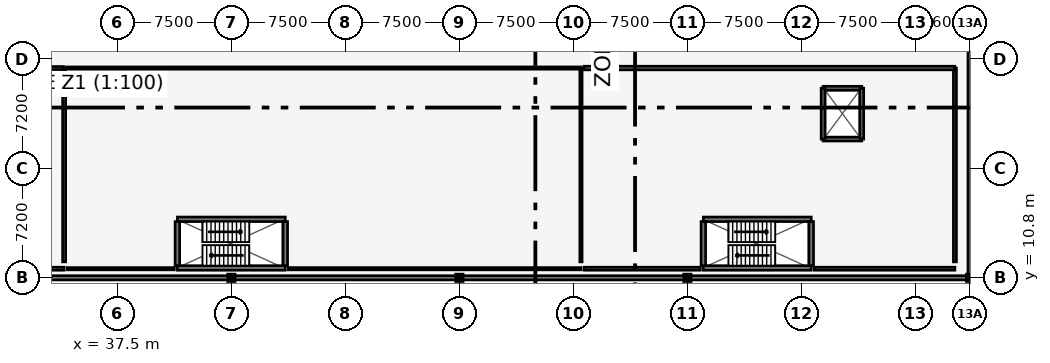
"""IFC4 building model, lengths in metres.
Left out: names, types, materials, properties, quantities, classifications, styles, units other than length and angle.
Written with IfcOpenShell. Run it as: python <this file> out.ifc"""

import sys

from ifc_helpers import new_model, si_unit, direction, frame, frame_2d, origin, origin_2d, place, context, subcontext, project, spatial, rectangle, i_section, extrude, element, fill, save


model = new_model("IFC4")
c1 = context("Model", 3, precision=1e-05, world=origin(), true_north=direction((0.0, 1.0)))
c2 = subcontext(c1, "Body", "Model", "MODEL_VIEW")
j1 = project(units=[si_unit("LENGTHUNIT", "METRE"), si_unit("PLANEANGLEUNIT", "RADIAN")], contexts=[c1])
p1 = place(None, origin())
s1 = spatial("IfcSite", under=j1, at=p1, CompositionType="ELEMENT")
p2 = place(p1, origin())
s2 = spatial("IfcBuilding", under=s1, at=p2, CompositionType="ELEMENT")
p3 = place(p2, frame((0.0, 0.0, 9.0)))
s3 = spatial("IfcBuildingStorey", under=s2, at=p3, CompositionType="ELEMENT", Elevation=9.0)
for number, where, z_axis, x_axis in (
    (1, (45.0, 10.8, 0.0), (0.0, 0.0, 1.0), (1.0, 0.0, 0.0)),
    (2, (60.0, 10.8, 0.0), (0.0, 0.0, 1.0), (1.0, 0.0, 0.0)),
    (3, (75.0, 10.8, 0.0), (0.0, 0.0, 1.0), (1.0, 0.0, 0.0)),
    (4, (93.6, 10.8, 0.0), (0.0, 0.0, 1.0), (1.0, 0.0, 0.0)),
):
    element("IfcColumn", number, at=place(p3, frame(where, z_axis=z_axis, x_axis=x_axis)), inside=s3, PredefinedType="COLUMN", context=c2, shape_type="SweptSolid", body=[
        extrude(i_section(OverallWidth=0.307, OverallDepth=0.315, WebThickness=0.012, FlangeThickness=0.019, at=origin_2d()), origin(), (0.0, 0.0, 1.0), 4.2),
    ])
p4 = place(p3, frame((0.0, 10.8, 0.0), z_axis=(0.0, 0.0, 1.0), x_axis=(1.0, 0.0, 0.0)))
e5 = element("IfcWall", 5, at=p4, inside=s3, PredefinedType="SOLIDWALL", context=c2, shape_type="SweptSolid", body=[
    extrude(rectangle(XDim=93.6, YDim=0.28, at=frame_2d((46.8, 0.0))), origin(), (0.0, 0.0, 1.0), 3.058),
])
p5 = place(p4, frame((2.2, 0.0, 0.78)))
e6 = element("IfcOpeningElement", 6, at=p5, cuts=e5, PredefinedType="OPENING", context=c2, shape_type="SweptSolid", body=[
    extrude(rectangle(XDim=1.25, YDim=1.7, at=frame_2d((0.625, 0.85))), frame((0.0, 0.15, 0.0), z_axis=(0.0, -1.0, 0.0), x_axis=(1.0, 0.0, 0.0)), (0.0, 0.0, 1.0), 0.3),
])
p6 = place(p4, frame((9.4, 0.0, 0.78)))
e7 = element("IfcOpeningElement", 7, at=p6, cuts=e5, PredefinedType="OPENING", context=c2, shape_type="SweptSolid", body=[
    extrude(rectangle(XDim=1.35, YDim=1.75, at=frame_2d((0.675, 0.875))), frame((0.0, 0.15, 0.0), z_axis=(0.0, -1.0, 0.0), x_axis=(1.0, 0.0, 0.0)), (0.0, 0.0, 1.0), 0.3),
])
p7 = place(p4, frame((16.6, 0.0, 0.78)))
e8 = element("IfcOpeningElement", 8, at=p7, cuts=e5, PredefinedType="OPENING", context=c2, shape_type="SweptSolid", body=[
    extrude(rectangle(XDim=1.5, YDim=1.75, at=frame_2d((0.75, 0.875))), frame((0.0, 0.15, 0.0), z_axis=(0.0, -1.0, 0.0), x_axis=(1.0, 0.0, 0.0)), (0.0, 0.0, 1.0), 0.3),
])
p8 = place(p4, frame((23.8, 0.0, 0.78)))
e9 = element("IfcOpeningElement", 9, at=p8, cuts=e5, PredefinedType="OPENING", context=c2, shape_type="SweptSolid", body=[
    extrude(rectangle(XDim=1.65, YDim=1.8, at=frame_2d((0.825, 0.9))), frame((0.0, 0.15, 0.0), z_axis=(0.0, -1.0, 0.0), x_axis=(1.0, 0.0, 0.0)), (0.0, 0.0, 1.0), 0.3),
])
p9 = place(p4, frame((31.0, 0.0, 0.78)))
e10 = element("IfcOpeningElement", 10, at=p9, cuts=e5, PredefinedType="OPENING", context=c2, shape_type="SweptSolid", body=[
    extrude(rectangle(XDim=1.95, YDim=1.8, at=frame_2d((0.975, 0.9))), frame((0.0, 0.15, 0.0), z_axis=(0.0, -1.0, 0.0), x_axis=(1.0, 0.0, 0.0)), (0.0, 0.0, 1.0), 0.3),
])
p10 = place(p4, frame((38.2, 0.0, 0.78)))
e11 = element("IfcOpeningElement", 11, at=p10, cuts=e5, PredefinedType="OPENING", context=c2, shape_type="SweptSolid", body=[
    extrude(rectangle(XDim=2.1, YDim=1.8, at=frame_2d((1.05, 0.9))), frame((0.0, 0.15, 0.0), z_axis=(0.0, -1.0, 0.0), x_axis=(1.0, 0.0, 0.0)), (0.0, 0.0, 1.0), 0.3),
])
p11 = place(p4, frame((52.6, 0.0, 0.78)))
e12 = element("IfcOpeningElement", 12, at=p11, cuts=e5, PredefinedType="OPENING", context=c2, shape_type="SweptSolid", body=[
    extrude(rectangle(XDim=1.25, YDim=1.7, at=frame_2d((0.625, 0.85))), frame((0.0, 0.15, 0.0), z_axis=(0.0, -1.0, 0.0), x_axis=(1.0, 0.0, 0.0)), (0.0, 0.0, 1.0), 0.3),
])
p12 = place(p4, frame((67.0, 0.0, 0.78)))
e13 = element("IfcOpeningElement", 13, at=p12, cuts=e5, PredefinedType="OPENING", context=c2, shape_type="SweptSolid", body=[
    extrude(rectangle(XDim=1.5, YDim=1.75, at=frame_2d((0.75, 0.875))), frame((0.0, 0.15, 0.0), z_axis=(0.0, -1.0, 0.0), x_axis=(1.0, 0.0, 0.0)), (0.0, 0.0, 1.0), 0.3),
])
p13 = place(p4, frame((81.4, 0.0, 0.78)))
e14 = element("IfcOpeningElement", 14, at=p13, cuts=e5, PredefinedType="OPENING", context=c2, shape_type="SweptSolid", body=[
    extrude(rectangle(XDim=1.95, YDim=1.8, at=frame_2d((0.975, 0.9))), frame((0.0, 0.15, 0.0), z_axis=(0.0, -1.0, 0.0), x_axis=(1.0, 0.0, 0.0)), (0.0, 0.0, 1.0), 0.3),
])
p14 = place(p3, frame((93.6, 10.8, 0.0), z_axis=(0.0, 0.0, 1.0), x_axis=(0.0, 1.0, 0.0)))
e15 = element("IfcWall", 15, at=p14, inside=s3, PredefinedType="SOLIDWALL", context=c2, shape_type="SweptSolid", body=[
    extrude(rectangle(XDim=21.6, YDim=0.28, at=frame_2d((10.8, 0.0))), origin(), (0.0, 0.0, 1.0), 3.134),
])
p15 = place(p14, frame((2.2, 0.0, 0.78)))
e16 = element("IfcOpeningElement", 16, at=p15, cuts=e15, PredefinedType="OPENING", context=c2, shape_type="SweptSolid", body=[
    extrude(rectangle(XDim=1.5, YDim=1.75, at=frame_2d((0.75, 0.875))), frame((0.0, 0.15, 0.0), z_axis=(0.0, -1.0, 0.0), x_axis=(1.0, 0.0, 0.0)), (0.0, 0.0, 1.0), 0.3),
])
p16 = place(p14, frame((9.4, 0.0, 0.78)))
e17 = element("IfcOpeningElement", 17, at=p16, cuts=e15, PredefinedType="OPENING", context=c2, shape_type="SweptSolid", body=[
    extrude(rectangle(XDim=1.65, YDim=1.8, at=frame_2d((0.825, 0.9))), frame((0.0, 0.15, 0.0), z_axis=(0.0, -1.0, 0.0), x_axis=(1.0, 0.0, 0.0)), (0.0, 0.0, 1.0), 0.3),
])
for number, where, z_axis, x_axis in (
    (18, (76.05, 11.45, 0.0), (0.0, 0.0, 1.0), (1.0, 0.0, 0.0)),
    (19, (83.15, 14.65, 0.0), (0.0, 0.0, 1.0), (-1.0, 0.0, 0.0)),
):
    element("IfcWall", number, at=place(p3, frame(where, z_axis=z_axis, x_axis=x_axis)), inside=s3, PredefinedType="SHEAR", context=c2, shape_type="SweptSolid", body=[
        extrude(rectangle(XDim=7.1, YDim=0.3, at=frame_2d((3.55, 0.0))), origin(), (0.0, 0.0, 1.0), 3.45),
    ])
p17 = place(p3, frame((83.15, 11.6, 0.0), z_axis=(0.0, 0.0, 1.0), x_axis=(0.0, 1.0, 0.0)))
e20 = element("IfcWall", 20, at=p17, inside=s3, PredefinedType="SHEAR", context=c2, shape_type="SweptSolid", body=[
    extrude(rectangle(XDim=2.9, YDim=0.3, at=frame_2d((1.45, 0.0))), origin(), (0.0, 0.0, 1.0), 3.45),
])
p18 = place(p3, frame((76.05, 14.5, 0.0), z_axis=(0.0, 0.0, 1.0), x_axis=(0.0, -1.0, 0.0)))
e21 = element("IfcWall", 21, at=p18, inside=s3, PredefinedType="SHEAR", context=c2, shape_type="SweptSolid", body=[
    extrude(rectangle(XDim=2.9, YDim=0.3, at=frame_2d((1.45, 0.0))), origin(), (0.0, 0.0, 1.0), 3.45),
])
p19 = place(p18, frame((0.75, 0.0, 0.0)))
e22 = element("IfcOpeningElement", 22, at=p19, cuts=e21, PredefinedType="OPENING", context=c2, shape_type="SweptSolid", body=[
    extrude(rectangle(XDim=1.05, YDim=2.15, at=frame_2d((0.525, 1.075))), frame((0.0, 0.16, 0.0), z_axis=(0.0, -1.0, 0.0), x_axis=(1.0, 0.0, 0.0)), (0.0, 0.0, 1.0), 0.32),
])
for number, where, z_axis, x_axis in (
    (23, (41.45, 11.45, 0.0), (0.0, 0.0, 1.0), (1.0, 0.0, 0.0)),
    (24, (48.55, 14.65, 0.0), (0.0, 0.0, 1.0), (-1.0, 0.0, 0.0)),
):
    element("IfcWall", number, at=place(p3, frame(where, z_axis=z_axis, x_axis=x_axis)), inside=s3, PredefinedType="SHEAR", context=c2, shape_type="SweptSolid", body=[
        extrude(rectangle(XDim=7.1, YDim=0.3, at=frame_2d((3.55, 0.0))), origin(), (0.0, 0.0, 1.0), 3.45),
    ])
p20 = place(p3, frame((48.55, 11.6, 0.0), z_axis=(0.0, 0.0, 1.0), x_axis=(0.0, 1.0, 0.0)))
e25 = element("IfcWall", 25, at=p20, inside=s3, PredefinedType="SHEAR", context=c2, shape_type="SweptSolid", body=[
    extrude(rectangle(XDim=2.9, YDim=0.3, at=frame_2d((1.45, 0.0))), origin(), (0.0, 0.0, 1.0), 3.45),
])
p21 = place(p3, frame((41.45, 14.5, 0.0), z_axis=(0.0, 0.0, 1.0), x_axis=(0.0, -1.0, 0.0)))
e26 = element("IfcWall", 26, at=p21, inside=s3, PredefinedType="SHEAR", context=c2, shape_type="SweptSolid", body=[
    extrude(rectangle(XDim=2.9, YDim=0.3, at=frame_2d((1.45, 0.0))), origin(), (0.0, 0.0, 1.0), 3.45),
])
p22 = place(p21, frame((0.75, 0.0, 0.0)))
e27 = element("IfcOpeningElement", 27, at=p22, cuts=e26, PredefinedType="OPENING", context=c2, shape_type="SweptSolid", body=[
    extrude(rectangle(XDim=1.07, YDim=2.15, at=frame_2d((0.535, 1.075))), frame((0.0, 0.16, 0.0), z_axis=(0.0, -1.0, 0.0), x_axis=(1.0, 0.0, 0.0)), (0.0, 0.0, 1.0), 0.32),
])
p23 = place(p3, frame((83.925, 19.925, 0.0), z_axis=(0.0, 0.0, 1.0), x_axis=(1.0, 0.0, 0.0)))
e28 = element("IfcWall", 28, at=p23, inside=s3, PredefinedType="SHEAR", context=c2, shape_type="SweptSolid", body=[
    extrude(rectangle(XDim=2.55, YDim=0.25, at=frame_2d((1.275, 0.0))), origin(), (0.0, 0.0, 1.0), 3.55),
])
p24 = place(p3, frame((86.475, 23.275, 0.0), z_axis=(0.0, 0.0, 1.0), x_axis=(-1.0, 0.0, 0.0)))
e29 = element("IfcWall", 29, at=p24, inside=s3, PredefinedType="SHEAR", context=c2, shape_type="SweptSolid", body=[
    extrude(rectangle(XDim=2.55, YDim=0.25, at=frame_2d((1.275, 0.0))), origin(), (0.0, 0.0, 1.0), 3.55),
])
p25 = place(p24, frame((0.525, 0.0, 0.0)))
e30 = element("IfcOpeningElement", 30, at=p25, cuts=e29, PredefinedType="OPENING", context=c2, shape_type="SweptSolid", body=[
    extrude(rectangle(XDim=1.5, YDim=2.2, at=frame_2d((0.75, 1.1))), frame((0.0, 0.135, 0.0), z_axis=(0.0, -1.0, 0.0), x_axis=(1.0, 0.0, 0.0)), (0.0, 0.0, 1.0), 0.27),
])
for number, where, z_axis, x_axis in (
    (31, (83.925, 23.275, 0.0), (0.0, 0.0, 1.0), (0.0, -1.0, 0.0)),
    (32, (86.475, 19.925, 0.0), (0.0, 0.0, 1.0), (0.0, 1.0, 0.0)),
):
    element("IfcWall", number, at=place(p3, frame(where, z_axis=z_axis, x_axis=x_axis)), inside=s3, PredefinedType="SHEAR", context=c2, shape_type="SweptSolid", body=[
        extrude(rectangle(XDim=3.35, YDim=0.25, at=frame_2d((1.675, 0.0))), origin(), (0.0, 0.0, 1.0), 3.55),
    ])
p26 = place(p3, frame((34.0, 11.4, 0.0), z_axis=(0.0, 0.0, 1.0), x_axis=(-1.0, 0.0, 0.0)))
e33 = element("IfcWall", 33, at=p26, inside=s3, PredefinedType="SOLIDWALL", context=c2, shape_type="SweptSolid", body=[
    extrude(rectangle(XDim=18.65, YDim=0.2, at=frame_2d((9.325, 0.0))), origin(), (0.0, 0.0, 1.0), 3.287),
])
p27 = place(p3, frame((34.0, 11.85, 0.0), z_axis=(0.0, 0.0, 1.0), x_axis=(0.0, 1.0, 0.0)))
e34 = element("IfcWall", 34, at=p27, inside=s3, PredefinedType="SOLIDWALL", context=c2, shape_type="SweptSolid", body=[
    extrude(rectangle(XDim=12.75, YDim=0.2, at=frame_2d((6.375, 0.0))), origin(), (0.0, 0.0, 1.0), 3.6),
])
p28 = place(p3, frame((1.2, 24.6, 0.0), z_axis=(0.0, 0.0, 1.0), x_axis=(1.0, 0.0, 0.0)))
e35 = element("IfcWall", 35, at=p28, inside=s3, PredefinedType="SOLIDWALL", context=c2, shape_type="SweptSolid", body=[
    extrude(rectangle(XDim=32.8, YDim=0.2, at=frame_2d((16.4, 0.0))), origin(), (0.0, 0.0, 1.0), 3.287),
])
p29 = place(p28, frame((15.5, 0.0, 0.0)))
e36 = element("IfcOpeningElement", 36, at=p29, cuts=e35, PredefinedType="OPENING", context=c2, shape_type="SweptSolid", body=[
    extrude(rectangle(XDim=1.8, YDim=2.2, at=frame_2d((0.9, 1.1))), frame((0.0, 0.11, 0.0), z_axis=(0.0, -1.0, 0.0), x_axis=(1.0, 0.0, 0.0)), (0.0, 0.0, 1.0), 0.22),
])
p30 = place(p28, frame((27.8, 0.0, 0.0)))
e37 = element("IfcOpeningElement", 37, at=p30, cuts=e35, PredefinedType="OPENING", context=c2, shape_type="SweptSolid", body=[
    extrude(rectangle(XDim=1.8, YDim=2.2, at=frame_2d((0.9, 1.1))), frame((0.0, 0.11, 0.0), z_axis=(0.0, -1.0, 0.0), x_axis=(1.0, 0.0, 0.0)), (0.0, 0.0, 1.0), 0.22),
])
p31 = place(p3, frame((68.0, 11.4, 0.0), z_axis=(0.0, 0.0, 1.0), x_axis=(-1.0, 0.0, 0.0)))
e38 = element("IfcWall", 38, at=p31, inside=s3, PredefinedType="PARTITIONING", context=c2, shape_type="SweptSolid", body=[
    extrude(rectangle(XDim=19.25, YDim=0.15, at=frame_2d((9.625, 0.0))), origin(), (0.0, 0.0, 1.0), 3.235),
])
p32 = place(p3, frame((41.25, 11.4, 0.0), z_axis=(0.0, 0.0, 1.0), x_axis=(-1.0, 0.0, 0.0)))
e39 = element("IfcWall", 39, at=p32, inside=s3, PredefinedType="PARTITIONING", context=c2, shape_type="SweptSolid", body=[
    extrude(rectangle(XDim=7.05, YDim=0.15, at=frame_2d((3.525, 0.0))), origin(), (0.0, 0.0, 1.0), 3.6),
])
p33 = place(p3, frame((68.0, 11.85, 0.0), z_axis=(0.0, 0.0, 1.0), x_axis=(0.0, 1.0, 0.0)))
e40 = element("IfcWall", 40, at=p33, inside=s3, PredefinedType="PARTITIONING", context=c2, shape_type="SweptSolid", body=[
    extrude(rectangle(XDim=12.75, YDim=0.15, at=frame_2d((6.375, 0.0))), origin(), (0.0, 0.0, 1.0), 3.6),
])
p34 = place(p3, frame((34.2, 24.6, 0.0), z_axis=(0.0, 0.0, 1.0), x_axis=(1.0, 0.0, 0.0)))
e41 = element("IfcWall", 41, at=p34, inside=s3, PredefinedType="PARTITIONING", context=c2, shape_type="SweptSolid", body=[
    extrude(rectangle(XDim=33.8, YDim=0.15, at=frame_2d((16.9, 0.0))), origin(), (0.0, 0.0, 1.0), 3.235),
])
p35 = place(p34, frame((16.38, 0.0, 0.0)))
e42 = element("IfcOpeningElement", 42, at=p35, cuts=e41, PredefinedType="OPENING", context=c2, shape_type="SweptSolid", body=[
    extrude(rectangle(XDim=1.04, YDim=2.15, at=frame_2d((0.52, 1.075))), frame((0.0, 0.085, 0.0), z_axis=(0.0, -1.0, 0.0), x_axis=(1.0, 0.0, 0.0)), (0.0, 0.0, 1.0), 0.17),
])
p36 = place(p34, frame((29.56, 0.0, 0.0)))
e43 = element("IfcOpeningElement", 43, at=p36, cuts=e41, PredefinedType="OPENING", context=c2, shape_type="SweptSolid", body=[
    extrude(rectangle(XDim=1.04, YDim=2.15, at=frame_2d((0.52, 1.075))), frame((0.0, 0.085, 0.0), z_axis=(0.0, -1.0, 0.0), x_axis=(1.0, 0.0, 0.0)), (0.0, 0.0, 1.0), 0.17),
])
p37 = place(p3, frame((92.6, 11.4, 0.0), z_axis=(0.0, 0.0, 1.0), x_axis=(-1.0, 0.0, 0.0)))
e44 = element("IfcWall", 44, at=p37, inside=s3, PredefinedType="SOLIDWALL", context=c2, shape_type="SweptSolid", body=[
    extrude(rectangle(XDim=9.25, YDim=0.2, at=frame_2d((4.625, 0.0))), origin(), (0.0, 0.0, 1.0), 3.6),
])
p38 = place(p3, frame((75.85, 11.4, 0.0), z_axis=(0.0, 0.0, 1.0), x_axis=(-1.0, 0.0, 0.0)))
e45 = element("IfcWall", 45, at=p38, inside=s3, PredefinedType="SOLIDWALL", context=c2, shape_type="SweptSolid", body=[
    extrude(rectangle(XDim=7.65, YDim=0.2, at=frame_2d((3.825, 0.0))), origin(), (0.0, 0.0, 1.0), 3.185),
])
p39 = place(p3, frame((92.6, 11.85, 0.0), z_axis=(0.0, 0.0, 1.0), x_axis=(0.0, 1.0, 0.0)))
e46 = element("IfcWall", 46, at=p39, inside=s3, PredefinedType="SOLIDWALL", context=c2, shape_type="SweptSolid", body=[
    extrude(rectangle(XDim=12.75, YDim=0.2, at=frame_2d((6.375, 0.0))), origin(), (0.0, 0.0, 1.0), 3.6),
])
p40 = place(p3, frame((68.2, 24.6, 0.0), z_axis=(0.0, 0.0, 1.0), x_axis=(1.0, 0.0, 0.0)))
e47 = element("IfcWall", 47, at=p40, inside=s3, PredefinedType="SOLIDWALL", context=c2, shape_type="SweptSolid", body=[
    extrude(rectangle(XDim=24.4, YDim=0.24, at=frame_2d((12.2, 0.0))), origin(), (0.0, 0.0, 1.0), 3.185),
])
p41 = place(p40, frame((11.4, 0.0, 0.0)))
e48 = element("IfcOpeningElement", 48, at=p41, cuts=e47, PredefinedType="OPENING", context=c2, shape_type="SweptSolid", body=[
    extrude(rectangle(XDim=1.6, YDim=2.15, at=frame_2d((0.8, 1.075))), frame((0.0, 0.13, 0.0), z_axis=(0.0, -1.0, 0.0), x_axis=(1.0, 0.0, 0.0)), (0.0, 0.0, 1.0), 0.26),
])
p42 = place(p10, origin())
e49 = element("IfcWindow", 49, at=p42, inside=s3, PartitioningType="SINGLE_PANEL", PredefinedType="WINDOW", context=c2, shape_type="SweptSolid", body=[
    extrude(rectangle(XDim=2.1, YDim=1.8, at=frame_2d((1.05, 0.9))), frame((0.0, 0.03, 0.0), z_axis=(0.0, -1.0, 0.0), x_axis=(1.0, 0.0, 0.0)), (0.0, 0.0, 1.0), 0.06),
])
fill(e11, e49)
p43 = place(p11, origin())
e50 = element("IfcWindow", 50, at=p43, inside=s3, PartitioningType="SINGLE_PANEL", PredefinedType="WINDOW", context=c2, shape_type="SweptSolid", body=[
    extrude(rectangle(XDim=1.25, YDim=1.7, at=frame_2d((0.625, 0.85))), frame((0.0, 0.03, 0.0), z_axis=(0.0, -1.0, 0.0), x_axis=(1.0, 0.0, 0.0)), (0.0, 0.0, 1.0), 0.06),
])
fill(e12, e50)
p44 = place(p12, origin())
e51 = element("IfcWindow", 51, at=p44, inside=s3, PartitioningType="SINGLE_PANEL", PredefinedType="WINDOW", context=c2, shape_type="SweptSolid", body=[
    extrude(rectangle(XDim=1.5, YDim=1.75, at=frame_2d((0.75, 0.875))), frame((0.0, 0.03, 0.0), z_axis=(0.0, -1.0, 0.0), x_axis=(1.0, 0.0, 0.0)), (0.0, 0.0, 1.0), 0.06),
])
fill(e13, e51)
p45 = place(p13, origin())
e52 = element("IfcWindow", 52, at=p45, inside=s3, PartitioningType="SINGLE_PANEL", PredefinedType="WINDOW", context=c2, shape_type="SweptSolid", body=[
    extrude(rectangle(XDim=1.95, YDim=1.8, at=frame_2d((0.975, 0.9))), frame((0.0, 0.03, 0.0), z_axis=(0.0, -1.0, 0.0), x_axis=(1.0, 0.0, 0.0)), (0.0, 0.0, 1.0), 0.06),
])
fill(e14, e52)
p46 = place(p15, origin())
e53 = element("IfcWindow", 53, at=p46, inside=s3, PartitioningType="SINGLE_PANEL", PredefinedType="WINDOW", context=c2, shape_type="SweptSolid", body=[
    extrude(rectangle(XDim=1.5, YDim=1.75, at=frame_2d((0.75, 0.875))), frame((0.0, 0.03, 0.0), z_axis=(0.0, -1.0, 0.0), x_axis=(1.0, 0.0, 0.0)), (0.0, 0.0, 1.0), 0.06),
])
fill(e16, e53)
p47 = place(p16, origin())
e54 = element("IfcWindow", 54, at=p47, inside=s3, PartitioningType="SINGLE_PANEL", PredefinedType="WINDOW", context=c2, shape_type="SweptSolid", body=[
    extrude(rectangle(XDim=1.65, YDim=1.8, at=frame_2d((0.825, 0.9))), frame((0.0, 0.03, 0.0), z_axis=(0.0, -1.0, 0.0), x_axis=(1.0, 0.0, 0.0)), (0.0, 0.0, 1.0), 0.06),
])
fill(e17, e54)
p48 = place(p19, origin())
e55 = element("IfcDoor", 55, at=p48, inside=s3, OperationType="SINGLE_SWING_LEFT", PredefinedType="DOOR", context=c2, shape_type="SweptSolid", body=[
    extrude(rectangle(XDim=1.05, YDim=2.15, at=frame_2d((0.525, 1.075))), frame((0.0, 0.025, 0.0), z_axis=(0.0, -1.0, 0.0), x_axis=(1.0, 0.0, 0.0)), (0.0, 0.0, 1.0), 0.05),
])
fill(e22, e55)
p49 = place(p22, origin())
e56 = element("IfcDoor", 56, at=p49, inside=s3, OperationType="SINGLE_SWING_RIGHT", PredefinedType="DOOR", context=c2, shape_type="SweptSolid", body=[
    extrude(rectangle(XDim=1.07, YDim=2.15, at=frame_2d((0.535, 1.075))), frame((0.0, 0.025, 0.0), z_axis=(0.0, -1.0, 0.0), x_axis=(1.0, 0.0, 0.0)), (0.0, 0.0, 1.0), 0.05),
])
fill(e27, e56)
p50 = place(p25, origin())
e57 = element("IfcDoor", 57, at=p50, inside=s3, OperationType="SLIDING_TO_RIGHT", PredefinedType="DOOR", context=c2, shape_type="SweptSolid", body=[
    extrude(rectangle(XDim=1.5, YDim=2.2, at=frame_2d((0.75, 1.1))), frame((0.0, 0.025, 0.0), z_axis=(0.0, -1.0, 0.0), x_axis=(1.0, 0.0, 0.0)), (0.0, 0.0, 1.0), 0.05),
])
fill(e30, e57)
p51 = place(p35, origin())
e58 = element("IfcDoor", 58, at=p51, inside=s3, OperationType="SINGLE_SWING_LEFT", PredefinedType="DOOR", context=c2, shape_type="SweptSolid", body=[
    extrude(rectangle(XDim=1.04, YDim=2.15, at=frame_2d((0.52, 1.075))), frame((0.0, 0.025, 0.0), z_axis=(0.0, -1.0, 0.0), x_axis=(1.0, 0.0, 0.0)), (0.0, 0.0, 1.0), 0.05),
])
fill(e42, e58)
p52 = place(p36, origin())
e59 = element("IfcDoor", 59, at=p52, inside=s3, OperationType="SINGLE_SWING_LEFT", PredefinedType="DOOR", context=c2, shape_type="SweptSolid", body=[
    extrude(rectangle(XDim=1.04, YDim=2.15, at=frame_2d((0.52, 1.075))), frame((0.0, 0.025, 0.0), z_axis=(0.0, -1.0, 0.0), x_axis=(1.0, 0.0, 0.0)), (0.0, 0.0, 1.0), 0.05),
])
fill(e43, e59)
p53 = place(p41, origin())
e60 = element("IfcDoor", 60, at=p53, inside=s3, OperationType="DOUBLE_SWING_RIGHT", PredefinedType="DOOR", context=c2, shape_type="SweptSolid", body=[
    extrude(rectangle(XDim=1.6, YDim=2.15, at=frame_2d((0.8, 1.075))), frame((0.0, 0.025, 0.0), z_axis=(0.0, -1.0, 0.0), x_axis=(1.0, 0.0, 0.0)), (0.0, 0.0, 1.0), 0.05),
])
fill(e48, e60)
save(model, sys.argv[1])
